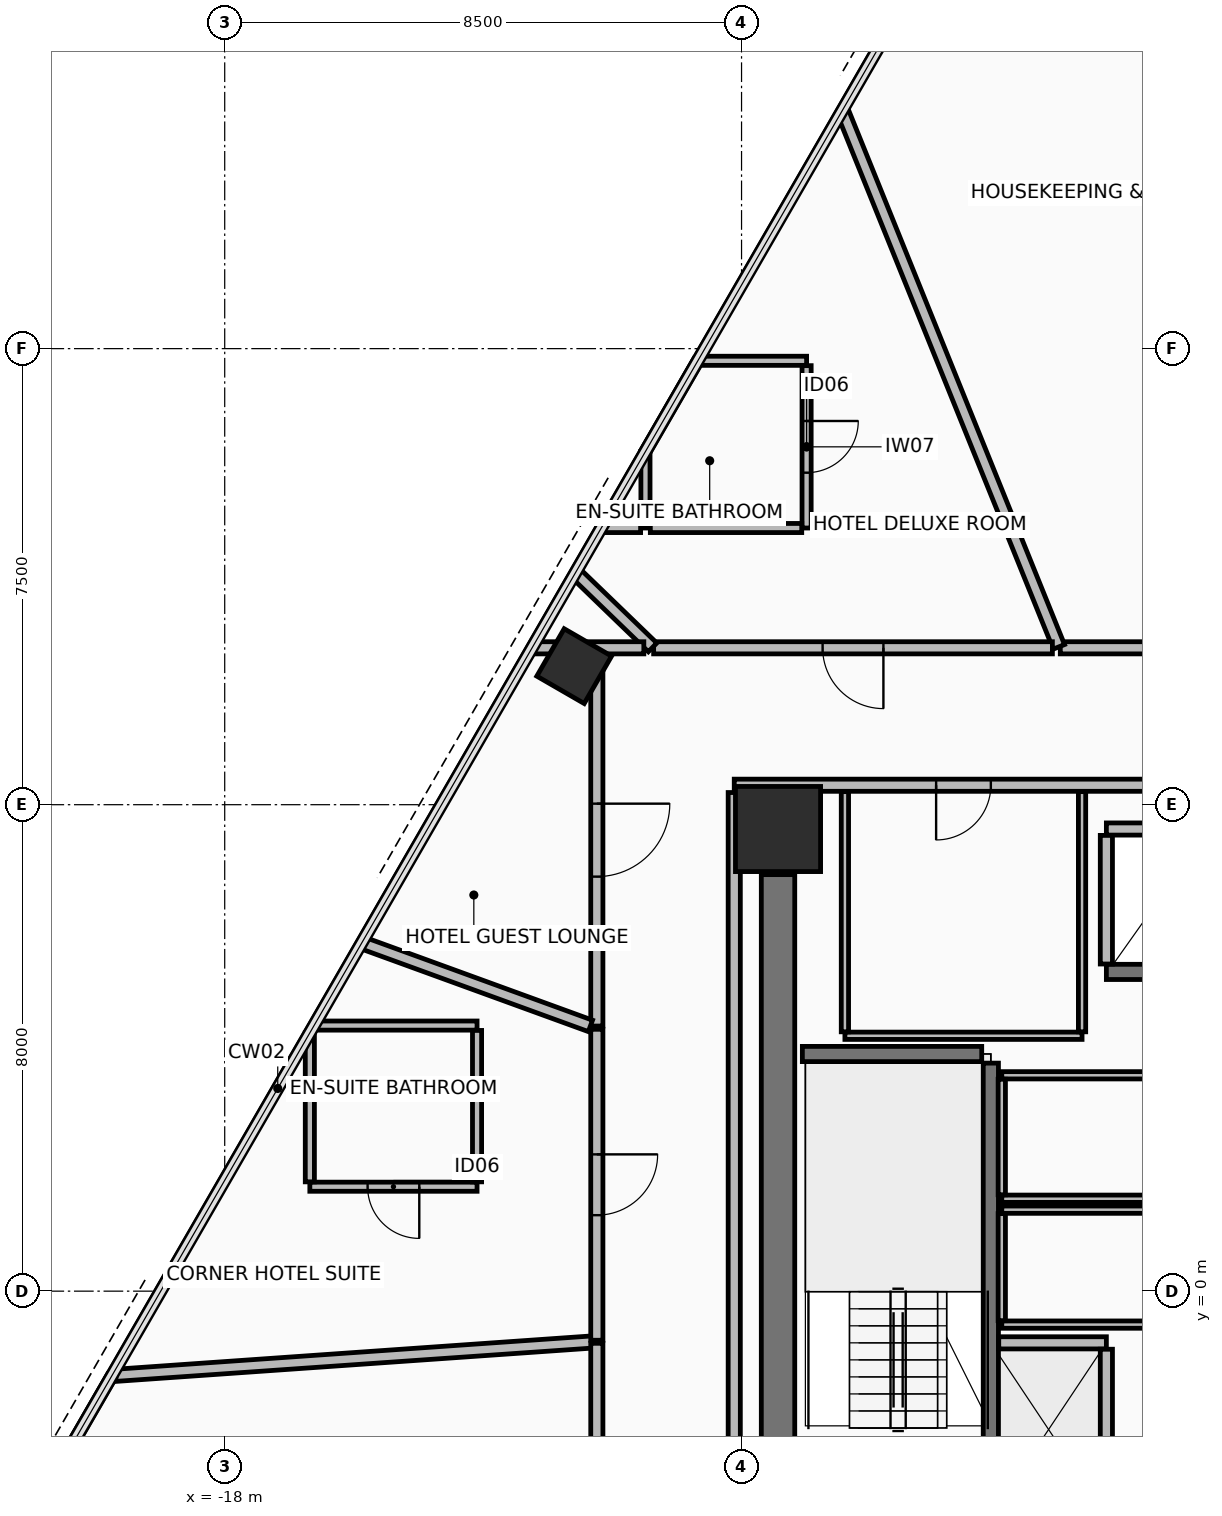
"""IFC4 building model, lengths in metres.
Left out: names, types, materials, properties, quantities, classifications, styles, units other than length and angle.
Written with IfcOpenShell. Run it as: python <this file> out.ifc"""

import sys

from ifc_helpers import new_model, si_unit, direction, frame, frame_2d, origin, origin_2d, place, context, subcontext, project, spatial, rectangle, hollow_rectangle, extrude, element, fill, save


model = new_model("IFC4")
c1 = context("Model", 3, precision=1e-05, world=origin(), true_north=direction((0.0, 1.0)))
c2 = subcontext(c1, "Body", "Model", "MODEL_VIEW")
j1 = project(units=[si_unit("LENGTHUNIT", "METRE"), si_unit("PLANEANGLEUNIT", "RADIAN")], contexts=[c1])
p1 = place(None, origin())
s1 = spatial("IfcSite", under=j1, at=p1, CompositionType="ELEMENT")
p2 = place(p1, origin())
s2 = spatial("IfcBuilding", under=s1, at=p2, CompositionType="ELEMENT")
p3 = place(p2, frame((0.0, 0.0, 45.45)))
s3 = spatial("IfcBuildingStorey", under=s2, at=p3, CompositionType="ELEMENT", Elevation=45.45)
p4 = place(p3, frame((-8.9, 7.6, 0.0), z_axis=(0.0, 0.0, 1.0), x_axis=(1.0, 0.0, 0.0)))
e1 = element("IfcColumn", 1, at=p4, inside=s3, PredefinedType="COLUMN", context=c2, shape_type="SweptSolid", body=[
    extrude(rectangle(XDim=1.4, YDim=1.4, at=origin_2d()), origin(), (0.0, 0.0, 1.0), 3.4),
])
p5 = place(p3, frame((-12.252, 10.279, 0.0), z_axis=(0.0, 0.0, 1.0), x_axis=(0.500001511499, 0.866024531118, 0.0)))
e2 = element("IfcColumn", 2, at=p5, inside=s3, PredefinedType="COLUMN", context=c2, shape_type="SweptSolid", body=[
    extrude(hollow_rectangle(XDim=0.9, YDim=0.9, WallThickness=0.05, at=origin_2d()), origin(), (0.0, 0.0, 1.0), 3.4),
])
p6 = place(p3, frame((0.0, 19.836, 0.0), z_axis=(0.0, 0.0, 1.0), x_axis=(-0.500005158081, 0.866022425744, 0.0)))
e3 = element("IfcWall", 3, at=p6, inside=s3, PredefinedType="STANDARD", context=c2, shape_type="SweptSolid", body=[
    extrude(rectangle(XDim=7.6, YDim=0.3, at=frame_2d((3.8, 0.0))), origin(), (0.0, 0.0, 1.0), 2.42),
])
p7 = place(p3, frame((-8.9, -3.85, 0.0), z_axis=(0.0, 0.0, 1.0), x_axis=(0.0, 1.0, 0.0)))
e4 = element("IfcWall", 4, at=p7, inside=s3, PredefinedType="SHEAR", context=c2, shape_type="SweptSolid", body=[
    extrude(rectangle(XDim=10.7, YDim=0.55, at=frame_2d((5.35, 0.0))), origin(), (0.0, 0.0, 1.0), 3.225),
])
p8 = place(p3, frame((9.62, 8.32, 0.0), z_axis=(0.0, 0.0, 1.0), x_axis=(-1.0, 0.0, 0.0)))
e5 = element("IfcWall", 5, at=p8, inside=s3, PredefinedType="PARTITIONING", context=c2, shape_type="SweptSolid", body=[
    extrude(rectangle(XDim=19.24, YDim=0.2, at=frame_2d((9.62, 0.0))), origin(), (0.0, 0.0, 1.0), 2.57),
])
p9 = place(p8, frame((15.02, 0.0, 0.0)))
e6 = element("IfcOpeningElement", 6, at=p9, cuts=e5, PredefinedType="OPENING", context=c2, shape_type="SweptSolid", body=[
    extrude(rectangle(XDim=0.9, YDim=2.1, at=frame_2d((0.45, 1.05))), frame((0.0, 0.11, 0.0), z_axis=(0.0, -1.0, 0.0), x_axis=(1.0, 0.0, 0.0)), (0.0, 0.0, 1.0), 0.22),
])
p10 = place(p3, frame((-9.62, 8.2, 0.0), z_axis=(0.0, 0.0, 1.0), x_axis=(0.0, -1.0, 0.0)))
e7 = element("IfcWall", 7, at=p10, inside=s3, PredefinedType="PARTITIONING", context=c2, shape_type="SweptSolid", body=[
    extrude(rectangle(XDim=16.4, YDim=0.2, at=frame_2d((8.2, 0.0))), origin(), (0.0, 0.0, 1.0), 2.62),
])
p11 = place(p10, frame((12.65, 0.0, 0.0)))
e8 = element("IfcOpeningElement", 8, at=p11, cuts=e7, PredefinedType="OPENING", context=c2, shape_type="SweptSolid", body=[
    extrude(rectangle(XDim=1.1, YDim=2.15, at=frame_2d((0.55, 1.075))), frame((0.0, 0.11, 0.0), z_axis=(0.0, -1.0, 0.0), x_axis=(1.0, 0.0, 0.0)), (0.0, 0.0, 1.0), 0.22),
])
p12 = place(p3, frame((-5.4, -3.55, 0.0), z_axis=(0.0, 0.0, 1.0), x_axis=(0.0, 1.0, 0.0)))
e9 = element("IfcWall", 9, at=p12, inside=s3, PredefinedType="SHEAR", context=c2, shape_type="SweptSolid", body=[
    extrude(rectangle(XDim=7.3, YDim=0.25, at=frame_2d((3.65, 0.0))), origin(), (0.0, 0.0, 1.0), 3.225),
])
p13 = place(p3, frame((-8.5, 3.9, 0.0), z_axis=(0.0, 0.0, 1.0), x_axis=(1.0, 0.0, 0.0)))
e10 = element("IfcWall", 10, at=p13, inside=s3, PredefinedType="SHEAR", context=c2, shape_type="SweptSolid", body=[
    extrude(rectangle(XDim=2.95, YDim=0.25, at=frame_2d((1.475, 0.0))), origin(), (0.0, 0.0, 1.0), 3.225),
])
p14 = place(p3, frame((-3.5, 5.25, 0.0), z_axis=(0.0, 0.0, 1.0), x_axis=(1.0, 0.0, 0.0)))
e11 = element("IfcWall", 11, at=p14, inside=s3, PredefinedType="SHEAR", context=c2, shape_type="SweptSolid", body=[
    extrude(rectangle(XDim=1.712, YDim=0.25, at=frame_2d((0.856, 0.0))), origin(), (0.0, 0.0, 1.0), 3.225),
])
p15 = place(p3, frame((-3.5, 7.6, 0.0), z_axis=(0.0, 0.0, 1.0), x_axis=(1.0, 0.0, 0.0)))
e12 = element("IfcWall", 12, at=p15, inside=s3, PredefinedType="PARTITIONING", context=c2, shape_type="SweptSolid", body=[
    extrude(rectangle(XDim=0.7, YDim=0.2, at=frame_2d((0.35, 0.0))), origin(), (0.0, 0.0, 1.0), 2.42),
])
p16 = place(p3, frame((-3.5, 5.38, 0.0), z_axis=(0.0, 0.0, 1.0), x_axis=(0.0, 1.0, 0.0)))
e13 = element("IfcWall", 13, at=p16, inside=s3, PredefinedType="PARTITIONING", context=c2, shape_type="SweptSolid", body=[
    extrude(rectangle(XDim=2.115, YDim=0.2, at=frame_2d((1.058, 0.0))), origin(), (0.0, 0.0, 1.0), 2.42),
])
p17 = place(p3, frame((-5.27, -0.85, 0.0), z_axis=(0.0, 0.0, 1.0), x_axis=(1.0, 0.0, 0.0)))
e14 = element("IfcWall", 14, at=p17, inside=s3, PredefinedType="PARTITIONING", context=c2, shape_type="SweptSolid", body=[
    extrude(rectangle(XDim=1.77, YDim=0.2, at=frame_2d((0.885, 0.0))), origin(), (0.0, 0.0, 1.0), 3.225),
])
p18 = place(p3, frame((-3.5, -3.57, 0.0), z_axis=(0.0, 0.0, 1.0), x_axis=(0.0, 1.0, 0.0)))
e15 = element("IfcWall", 15, at=p18, inside=s3, PredefinedType="PARTITIONING", context=c2, shape_type="SweptSolid", body=[
    extrude(rectangle(XDim=2.615, YDim=0.2, at=frame_2d((1.308, 0.0))), origin(), (0.0, 0.0, 1.0), 3.225),
])
p19 = place(p3, frame((-5.22, 1.52, 0.0), z_axis=(0.0, 0.0, 1.0), x_axis=(1.0, 0.0, 0.0)))
e16 = element("IfcWall", 16, at=p19, inside=s3, PredefinedType="PARTITIONING", context=c2, shape_type="SweptSolid", body=[
    extrude(rectangle(XDim=3.47, YDim=0.12, at=frame_2d((1.735, 0.0))), origin(), (0.0, 0.0, 1.0), 3.225),
])
p20 = place(p3, frame((-1.815, 3.55, 0.0), z_axis=(0.0, 0.0, 1.0), x_axis=(-1.0, 0.0, 0.0)))
e17 = element("IfcWall", 17, at=p20, inside=s3, PredefinedType="PARTITIONING", context=c2, shape_type="SweptSolid", body=[
    extrude(rectangle(XDim=3.405, YDim=0.12, at=frame_2d((1.703, 0.0))), origin(), (0.0, 0.0, 1.0), 3.225),
])
p21 = place(p3, frame((-5.22, 3.485, 0.0), z_axis=(0.0, 0.0, 1.0), x_axis=(0.0, -1.0, 0.0)))
e18 = element("IfcWall", 18, at=p21, inside=s3, PredefinedType="PARTITIONING", context=c2, shape_type="SweptSolid", body=[
    extrude(rectangle(XDim=1.9, YDim=0.12, at=frame_2d((0.95, 0.0))), origin(), (0.0, 0.0, 1.0), 3.225),
])
p22 = place(p3, frame((-5.22, -0.55, 0.0), z_axis=(0.0, 0.0, 1.0), x_axis=(1.0, 0.0, 0.0)))
e19 = element("IfcWall", 19, at=p22, inside=s3, PredefinedType="PARTITIONING", context=c2, shape_type="SweptSolid", body=[
    extrude(rectangle(XDim=3.47, YDim=0.12, at=frame_2d((1.735, 0.0))), origin(), (0.0, 0.0, 1.0), 3.225),
])
p23 = place(p3, frame((-1.815, 1.34, 0.0), z_axis=(0.0, 0.0, 1.0), x_axis=(-1.0, 0.0, 0.0)))
e20 = element("IfcWall", 20, at=p23, inside=s3, PredefinedType="PARTITIONING", context=c2, shape_type="SweptSolid", body=[
    extrude(rectangle(XDim=3.405, YDim=0.12, at=frame_2d((1.703, 0.0))), origin(), (0.0, 0.0, 1.0), 3.225),
])
p24 = place(p3, frame((-5.22, 1.275, 0.0), z_axis=(0.0, 0.0, 1.0), x_axis=(0.0, -1.0, 0.0)))
e21 = element("IfcWall", 21, at=p24, inside=s3, PredefinedType="PARTITIONING", context=c2, shape_type="SweptSolid", body=[
    extrude(rectangle(XDim=1.76, YDim=0.12, at=frame_2d((0.88, 0.0))), origin(), (0.0, 0.0, 1.0), 3.225),
])
p25 = place(p3, frame((-7.8, 4.2, 0.0), z_axis=(0.0, 0.0, 1.0), x_axis=(1.0, 0.0, 0.0)))
e22 = element("IfcWall", 22, at=p25, inside=s3, PredefinedType="PARTITIONING", context=c2, shape_type="SweptSolid", body=[
    extrude(rectangle(XDim=3.9, YDim=0.12, at=frame_2d((1.95, 0.0))), origin(), (0.0, 0.0, 1.0), 3.225),
])
for number, where, z_axis, x_axis in (
    (23, (-3.9, 4.265, 0.0), (0.0, 0.0, 1.0), (0.0, 1.0, 0.0)),
    (24, (-7.8, 8.215, 0.0), (0.0, 0.0, 1.0), (0.0, -1.0, 0.0)),
):
    element("IfcWall", number, at=place(p3, frame(where, z_axis=z_axis, x_axis=x_axis)), inside=s3, PredefinedType="PARTITIONING", context=c2, shape_type="SweptSolid", body=[
        extrude(rectangle(XDim=3.95, YDim=0.12, at=frame_2d((1.975, 0.0))), origin(), (0.0, 0.0, 1.0), 2.42),
    ])
p26 = place(p3, frame((-11.08, 12.55, 0.0), z_axis=(0.0, 0.0, 1.0), x_axis=(0.0, 1.0, 0.0)))
e25 = element("IfcWall", 25, at=p26, inside=s3, PredefinedType="PARTITIONING", context=c2, shape_type="SweptSolid", body=[
    extrude(rectangle(XDim=1.259, YDim=0.15, at=frame_2d((0.629, 0.0))), origin(), (0.0, 0.0, 1.0), 2.42),
])
p27 = place(p3, frame((-11.08, 13.809, 0.0), z_axis=(0.0, 0.0, 1.0), x_axis=(0.499996513224, 0.866027416866, 0.0)))
e26 = element("IfcWall", 26, at=p27, inside=s3, PredefinedType="PARTITIONING", context=c2, shape_type="SweptSolid", body=[
    extrude(rectangle(XDim=1.722, YDim=0.15, at=frame_2d((0.861, 0.0))), origin(), (0.0, 0.0, 1.0), 3.225),
])
p28 = place(p3, frame((-10.219, 15.3, 0.0), z_axis=(0.0, 0.0, 1.0), x_axis=(1.0, 0.0, 0.0)))
e27 = element("IfcWall", 27, at=p28, inside=s3, PredefinedType="PARTITIONING", context=c2, shape_type="SweptSolid", body=[
    extrude(rectangle(XDim=1.789, YDim=0.15, at=frame_2d((0.895, 0.0))), origin(), (0.0, 0.0, 1.0), 2.42),
])
p29 = place(p3, frame((-8.43, 15.22, 0.0), z_axis=(0.0, 0.0, 1.0), x_axis=(0.0, -1.0, 0.0)))
e28 = element("IfcWall", 28, at=p29, inside=s3, PredefinedType="PARTITIONING", context=c2, shape_type="SweptSolid", body=[
    extrude(rectangle(XDim=2.67, YDim=0.15, at=frame_2d((1.335, 0.0))), origin(), (0.0, 0.0, 1.0), 3.225),
])
p30 = place(p29, frame((0.91, 0.0, 0.0)))
e29 = element("IfcOpeningElement", 29, at=p30, cuts=e28, PredefinedType="OPENING", context=c2, shape_type="SweptSolid", body=[
    extrude(rectangle(XDim=0.85, YDim=2.1, at=frame_2d((0.425, 1.05))), frame((0.0, 0.085, 0.0), z_axis=(0.0, -1.0, 0.0), x_axis=(1.0, 0.0, 0.0)), (0.0, 0.0, 1.0), 0.17),
])
p31 = place(p3, frame((-8.51, 12.55, 0.0), z_axis=(0.0, 0.0, 1.0), x_axis=(-1.0, 0.0, 0.0)))
e30 = element("IfcWall", 30, at=p31, inside=s3, PredefinedType="PARTITIONING", context=c2, shape_type="SweptSolid", body=[
    extrude(rectangle(XDim=2.49, YDim=0.15, at=frame_2d((1.245, 0.0))), origin(), (0.0, 0.0, 1.0), 2.42),
])
p32 = place(p3, frame((-11.16, 12.55, 0.0), z_axis=(0.0, 0.0, 1.0), x_axis=(-1.0, 0.0, 0.0)))
e31 = element("IfcWall", 31, at=p32, inside=s3, PredefinedType="PARTITIONING", context=c2, shape_type="SweptSolid", body=[
    extrude(rectangle(XDim=0.647, YDim=0.15, at=frame_2d((0.323, 0.0))), origin(), (0.0, 0.0, 1.0), 2.42),
])
p33 = place(p3, frame((-13.85, 1.718, 0.0), z_axis=(0.0, 0.0, 1.0), x_axis=(-1.0, 0.0, 0.0)))
e32 = element("IfcWall", 32, at=p33, inside=s3, PredefinedType="PARTITIONING", context=c2, shape_type="SweptSolid", body=[
    extrude(rectangle(XDim=2.75, YDim=0.15, at=frame_2d((1.375, 0.0))), origin(), (0.0, 0.0, 1.0), 2.82),
])
p34 = place(p33, frame((0.95, 0.0, 0.0)))
e33 = element("IfcOpeningElement", 33, at=p34, cuts=e32, PredefinedType="OPENING", context=c2, shape_type="SweptSolid", body=[
    extrude(rectangle(XDim=0.85, YDim=2.1, at=frame_2d((0.425, 1.05))), frame((0.0, 0.085, 0.0), z_axis=(0.0, -1.0, 0.0), x_axis=(1.0, 0.0, 0.0)), (0.0, 0.0, 1.0), 0.17),
])
p35 = place(p3, frame((-16.6, 1.798, 0.0), z_axis=(0.0, 0.0, 1.0), x_axis=(0.0, 1.0, 0.0)))
e34 = element("IfcWall", 34, at=p35, inside=s3, PredefinedType="PARTITIONING", context=c2, shape_type="SweptSolid", body=[
    extrude(rectangle(XDim=2.45, YDim=0.15, at=frame_2d((1.225, 0.0))), origin(), (0.0, 0.0, 1.0), 2.42),
])
p36 = place(p3, frame((-16.531, 4.368, 0.0), z_axis=(0.0, 0.0, 1.0), x_axis=(1.0, 0.0, 0.0)))
e35 = element("IfcWall", 35, at=p36, inside=s3, PredefinedType="PARTITIONING", context=c2, shape_type="SweptSolid", body=[
    extrude(rectangle(XDim=2.681, YDim=0.15, at=frame_2d((1.34, 0.0))), origin(), (0.0, 0.0, 1.0), 2.42),
])
p37 = place(p3, frame((-13.85, 4.288, 0.0), z_axis=(0.0, 0.0, 1.0), x_axis=(0.0, -1.0, 0.0)))
e36 = element("IfcWall", 36, at=p37, inside=s3, PredefinedType="PARTITIONING", context=c2, shape_type="SweptSolid", body=[
    extrude(rectangle(XDim=2.49, YDim=0.15, at=frame_2d((1.245, 0.0))), origin(), (0.0, 0.0, 1.0), 2.82),
])
p38 = place(p3, frame((-19.841, -1.387, 0.0), z_axis=(0.0, 0.0, 1.0), x_axis=(0.997562942672, 0.069772311179, 0.0)))
e37 = element("IfcWall", 37, at=p38, inside=s3, PredefinedType="PARTITIONING", context=c2, shape_type="SweptSolid", body=[
    extrude(rectangle(XDim=7.953, YDim=0.2, at=frame_2d((3.977, 0.0))), origin(), (0.0, 0.0, 1.0), 2.42),
])
p39 = place(p3, frame((-11.88, -0.857, 0.0), z_axis=(0.0, 0.0, 1.0), x_axis=(0.0, -1.0, 0.0)))
e38 = element("IfcWall", 38, at=p39, inside=s3, PredefinedType="PARTITIONING", context=c2, shape_type="SweptSolid", body=[
    extrude(rectangle(XDim=5.444, YDim=0.2, at=frame_2d((2.722, 0.0))), origin(), (0.0, 0.0, 1.0), 3.225),
])
p40 = place(p39, frame((2.297, 0.0, 0.0)))
e39 = element("IfcOpeningElement", 39, at=p40, cuts=e38, PredefinedType="OPENING", context=c2, shape_type="SweptSolid", body=[
    extrude(rectangle(XDim=0.85, YDim=2.1, at=frame_2d((0.425, 1.05))), frame((0.0, 0.11, 0.0), z_axis=(0.0, -1.0, 0.0), x_axis=(1.0, 0.0, 0.0)), (0.0, 0.0, 1.0), 0.22),
])
p41 = place(p3, frame((-27.393, -14.446, 0.0), z_axis=(0.0, 0.0, 1.0), x_axis=(0.500006761757, 0.866021499847, 0.0)))
e40 = element("IfcWall", 40, at=p41, inside=s3, PredefinedType="PARTITIONING", context=c2, shape_type="SweptSolid", body=[
    extrude(rectangle(XDim=15.065, YDim=0.15, at=frame_2d((7.532, 0.0))), origin(), (0.0, 0.0, 1.0), 3.225),
])
p42 = place(p3, frame((0.345, 10.58, 0.0), z_axis=(0.0, 0.0, 1.0), x_axis=(-1.0, 0.0, 0.0)))
e41 = element("IfcWall", 41, at=p42, inside=s3, PredefinedType="PARTITIONING", context=c2, shape_type="SweptSolid", body=[
    extrude(rectangle(XDim=4.603, YDim=0.2, at=frame_2d((2.302, 0.0))), origin(), (0.0, 0.0, 1.0), 3.225),
])
p43 = place(p42, frame((1.851, 0.0, 0.0)))
e42 = element("IfcOpeningElement", 42, at=p43, cuts=e41, PredefinedType="OPENING", context=c2, shape_type="SweptSolid", body=[
    extrude(rectangle(XDim=0.9, YDim=2.1, at=frame_2d((0.45, 1.05))), frame((0.0, 0.11, 0.0), z_axis=(0.0, -1.0, 0.0), x_axis=(1.0, 0.0, 0.0)), (0.0, 0.0, 1.0), 0.22),
])
p44 = place(p3, frame((-4.281, 10.596, 0.0), z_axis=(0.0, 0.0, 1.0), x_axis=(-0.374587987238, 0.927191371733, 0.0)))
e43 = element("IfcWall", 43, at=p44, inside=s3, PredefinedType="PARTITIONING", context=c2, shape_type="SweptSolid", body=[
    extrude(rectangle(XDim=9.499, YDim=0.2, at=frame_2d((4.75, 0.0))), origin(), (0.0, 0.0, 1.0), 2.42),
])
p45 = place(p3, frame((-4.388, 10.58, 0.0), z_axis=(0.0, 0.0, 1.0), x_axis=(-1.0, 0.0, 0.0)))
e44 = element("IfcWall", 44, at=p45, inside=s3, PredefinedType="PARTITIONING", context=c2, shape_type="SweptSolid", body=[
    extrude(rectangle(XDim=6.558, YDim=0.2, at=frame_2d((3.279, 0.0))), origin(), (0.0, 0.0, 1.0), 2.62),
])
p46 = place(p45, frame((2.779, 0.0, 0.0)))
e45 = element("IfcOpeningElement", 45, at=p46, cuts=e44, PredefinedType="OPENING", context=c2, shape_type="SweptSolid", body=[
    extrude(rectangle(XDim=1.0, YDim=2.15, at=frame_2d((0.5, 1.075))), frame((0.0, 0.11, 0.0), z_axis=(0.0, -1.0, 0.0), x_axis=(1.0, 0.0, 0.0)), (0.0, 0.0, 1.0), 0.22),
])
p47 = place(p3, frame((-10.963, 10.587, 0.0), z_axis=(0.0, 0.0, 1.0), x_axis=(-0.71930985927, 0.694689374006, 0.0)))
e46 = element("IfcWall", 46, at=p47, inside=s3, PredefinedType="PARTITIONING", context=c2, shape_type="SweptSolid", body=[
    extrude(rectangle(XDim=1.745, YDim=0.2, at=frame_2d((0.873, 0.0))), origin(), (0.0, 0.0, 1.0), 2.42),
])
p48 = place(p3, frame((-11.107, 10.58, 0.0), z_axis=(0.0, 0.0, 1.0), x_axis=(-1.0, 0.0, 0.0)))
e47 = element("IfcWall", 47, at=p48, inside=s3, PredefinedType="PARTITIONING", context=c2, shape_type="SweptSolid", body=[
    extrude(rectangle(XDim=1.837, YDim=0.2, at=frame_2d((0.918, 0.0))), origin(), (0.0, 0.0, 1.0), 2.42),
])
p49 = place(p3, frame((-11.88, 10.475, 0.0), z_axis=(0.0, 0.0, 1.0), x_axis=(0.0, -1.0, 0.0)))
e48 = element("IfcWall", 48, at=p49, inside=s3, PredefinedType="PARTITIONING", context=c2, shape_type="SweptSolid", body=[
    extrude(rectangle(XDim=6.115, YDim=0.2, at=frame_2d((3.058, 0.0))), origin(), (0.0, 0.0, 1.0), 2.42),
])
p50 = place(p49, frame((2.458, 0.0, 0.0)))
e49 = element("IfcOpeningElement", 49, at=p50, cuts=e48, PredefinedType="OPENING", context=c2, shape_type="SweptSolid", body=[
    extrude(rectangle(XDim=1.2, YDim=2.15, at=frame_2d((0.6, 1.075))), frame((0.0, 0.11, 0.0), z_axis=(0.0, -1.0, 0.0), x_axis=(1.0, 0.0, 0.0)), (0.0, 0.0, 1.0), 0.22),
])
p51 = place(p3, frame((-11.985, 4.362, 0.0), z_axis=(0.0, 0.0, 1.0), x_axis=(-0.939696437289, 0.342009657388, 0.0)))
e50 = element("IfcWall", 50, at=p51, inside=s3, PredefinedType="PARTITIONING", context=c2, shape_type="SweptSolid", body=[
    extrude(rectangle(XDim=3.97, YDim=0.2, at=frame_2d((1.985, 0.0))), origin(), (0.0, 0.0, 1.0), 2.42),
])
p52 = place(p3, frame((-11.88, 4.306, 0.0), z_axis=(0.0, 0.0, 1.0), x_axis=(0.0, -1.0, 0.0)))
e51 = element("IfcWall", 51, at=p52, inside=s3, PredefinedType="PARTITIONING", context=c2, shape_type="SweptSolid", body=[
    extrude(rectangle(XDim=5.114, YDim=0.2, at=frame_2d((2.557, 0.0))), origin(), (0.0, 0.0, 1.0), 3.225),
])
p53 = place(p52, frame((2.057, 0.0, 0.0)))
e52 = element("IfcOpeningElement", 52, at=p53, cuts=e51, PredefinedType="OPENING", context=c2, shape_type="SweptSolid", body=[
    extrude(rectangle(XDim=1.0, YDim=2.15, at=frame_2d((0.5, 1.075))), frame((0.0, 0.11, 0.0), z_axis=(0.0, -1.0, 0.0), x_axis=(1.0, 0.0, 0.0)), (0.0, 0.0, 1.0), 0.22),
])
p54 = place(p9, frame((0.9, 0.0, 0.0), z_axis=(0.0, 0.0, 1.0), x_axis=(-1.0, 0.0, 0.0)))
e53 = element("IfcDoor", 53, at=p54, inside=s3, OperationType="SINGLE_SWING_LEFT", PredefinedType="DOOR", context=c2, shape_type="SweptSolid", body=[
    extrude(rectangle(XDim=0.9, YDim=2.1, at=frame_2d((0.45, 1.05))), frame((0.0, 0.025, 0.0), z_axis=(0.0, -1.0, 0.0), x_axis=(1.0, 0.0, 0.0)), (0.0, 0.0, 1.0), 0.05),
])
fill(e6, e53)
p55 = place(p30, origin())
e54 = element("IfcDoor", 54, at=p55, inside=s3, OperationType="SINGLE_SWING_RIGHT", PredefinedType="DOOR", context=c2, shape_type="SweptSolid", body=[
    extrude(rectangle(XDim=0.85, YDim=2.1, at=frame_2d((0.425, 1.05))), frame((0.0, 0.025, 0.0), z_axis=(0.0, -1.0, 0.0), x_axis=(1.0, 0.0, 0.0)), (0.0, 0.0, 1.0), 0.05),
])
fill(e29, e54)
p56 = place(p34, origin())
e55 = element("IfcDoor", 55, at=p56, inside=s3, OperationType="SINGLE_SWING_RIGHT", PredefinedType="DOOR", context=c2, shape_type="SweptSolid", body=[
    extrude(rectangle(XDim=0.85, YDim=2.1, at=frame_2d((0.425, 1.05))), frame((0.0, 0.025, 0.0), z_axis=(0.0, -1.0, 0.0), x_axis=(1.0, 0.0, 0.0)), (0.0, 0.0, 1.0), 0.05),
])
fill(e33, e55)
p57 = place(p46, origin())
e56 = element("IfcDoor", 56, at=p57, inside=s3, OperationType="SINGLE_SWING_LEFT", PredefinedType="DOOR", context=c2, shape_type="SweptSolid", body=[
    extrude(rectangle(XDim=1.0, YDim=2.15, at=frame_2d((0.5, 1.075))), frame((0.0, 0.025, 0.0), z_axis=(0.0, -1.0, 0.0), x_axis=(1.0, 0.0, 0.0)), (0.0, 0.0, 1.0), 0.05),
])
fill(e45, e56)
p58 = place(p50, origin())
e57 = element("IfcDoor", 57, at=p58, inside=s3, OperationType="SINGLE_SWING_LEFT", PredefinedType="DOOR", context=c2, shape_type="SweptSolid", body=[
    extrude(rectangle(XDim=1.2, YDim=2.15, at=frame_2d((0.6, 1.075))), frame((0.0, 0.025, 0.0), z_axis=(0.0, -1.0, 0.0), x_axis=(1.0, 0.0, 0.0)), (0.0, 0.0, 1.0), 0.05),
])
fill(e49, e57)
p59 = place(p53, origin())
e58 = element("IfcDoor", 58, at=p59, inside=s3, OperationType="SINGLE_SWING_LEFT", PredefinedType="DOOR", context=c2, shape_type="SweptSolid", body=[
    extrude(rectangle(XDim=1.0, YDim=2.15, at=frame_2d((0.5, 1.075))), frame((0.0, 0.025, 0.0), z_axis=(0.0, -1.0, 0.0), x_axis=(1.0, 0.0, 0.0)), (0.0, 0.0, 1.0), 0.05),
])
fill(e52, e58)
save(model, sys.argv[1])
